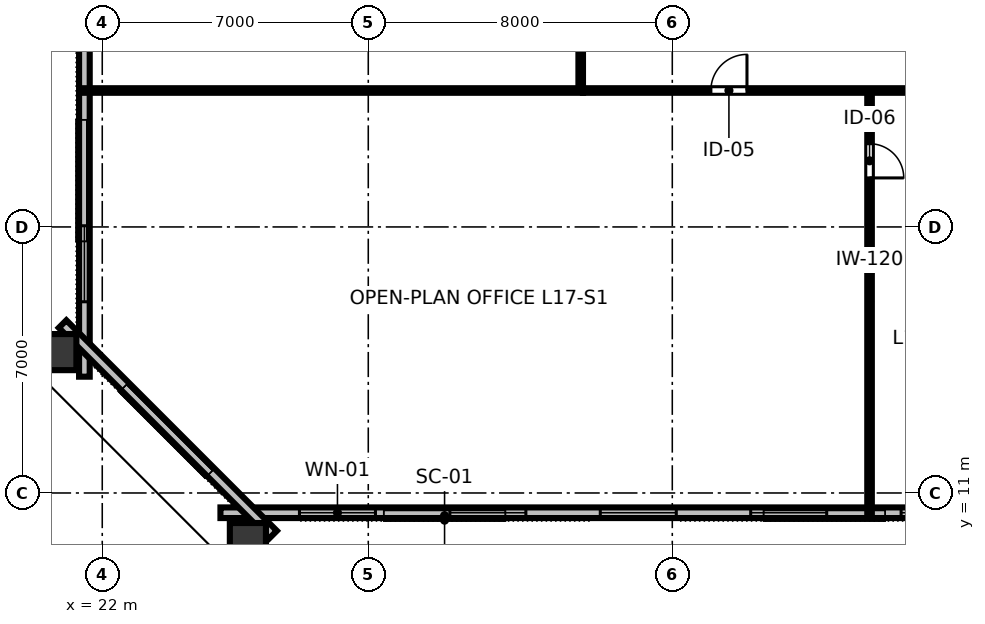
"""IFC4 building model, lengths in metres.
Left out: names, types, materials, properties, quantities, classifications, styles, units other than length and angle.
Written with IfcOpenShell. Run it as: python <this file> out.ifc"""

import sys

from ifc_helpers import new_model, si_unit, direction, frame, frame_2d, origin, origin_2d, place, context, subcontext, project, spatial, rectangle, hollow_rectangle, extrude, element, fill, save


model = new_model("IFC4")
c1 = context("Model", 3, precision=1e-05, world=origin(), true_north=direction((0.0, 1.0)))
c2 = subcontext(c1, "Body", "Model", "MODEL_VIEW")
j1 = project(units=[si_unit("LENGTHUNIT", "METRE"), si_unit("PLANEANGLEUNIT", "RADIAN")], contexts=[c1])
p1 = place(None, origin())
s1 = spatial("IfcSite", under=j1, at=p1, CompositionType="ELEMENT")
p2 = place(p1, origin())
s2 = spatial("IfcBuilding", under=s1, at=p2, CompositionType="ELEMENT")
p3 = place(p2, frame((0.0, 0.0, 67.6)))
s3 = spatial("IfcBuildingStorey", under=s2, at=p3, CompositionType="ELEMENT", Elevation=67.6)
p4 = place(p3, frame((25.832, 9.635, 0.0), z_axis=(-0.044927645815, -0.088480693771, 0.995064155455), x_axis=(0.891639602851, -0.452745865389, 0.0)))
e1 = element("IfcColumn", 1, at=p4, inside=s3, PredefinedType="COLUMN", context=c2, shape_type="SweptSolid", body=[
    extrude(hollow_rectangle(XDim=0.95, YDim=1.15, WallThickness=0.06, at=origin_2d()), origin(), (0.0, 0.0, 1.0), 3.375),
])
p5 = place(p3, frame((20.744, 14.707, 0.0), z_axis=(-0.103221863164, -0.030287087301, 0.994197133021), x_axis=(0.953979075254, 0.279914028383, 0.107573512968)))
e2 = element("IfcColumn", 2, at=p5, inside=s3, PredefinedType="COLUMN", context=c2, shape_type="SweptSolid", body=[
    extrude(hollow_rectangle(XDim=0.95, YDim=1.15, WallThickness=0.06, at=origin_2d()), origin(), (0.0, 0.0, 1.0), 3.377),
])
p6 = place(p3, frame((25.11, 10.48, 0.0), z_axis=(0.0, 0.0, 1.0), x_axis=(1.0, 0.0, 0.0)))
e3 = element("IfcWall", 3, at=p6, inside=s3, PredefinedType="STANDARD", context=c2, shape_type="SweptSolid", body=[
    extrude(rectangle(XDim=41.78, YDim=0.28, at=frame_2d((20.89, 0.0))), origin(), (0.0, 0.0, 1.0), 3.36),
])
p7 = place(p6, frame((2.079, 0.0, 0.8)))
e4 = element("IfcOpeningElement", 4, at=p7, cuts=e3, PredefinedType="OPENING", context=c2, shape_type="SweptSolid", body=[
    extrude(rectangle(XDim=2.0, YDim=1.95, at=frame_2d((1.0, 0.975))), frame((0.0, 0.15, 0.0), z_axis=(0.0, -1.0, 0.0), x_axis=(1.0, 0.0, 0.0)), (0.0, 0.0, 1.0), 0.3),
])
p8 = place(p6, frame((6.037, 0.0, 0.8)))
e5 = element("IfcOpeningElement", 5, at=p8, cuts=e3, PredefinedType="OPENING", context=c2, shape_type="SweptSolid", body=[
    extrude(rectangle(XDim=2.0, YDim=1.95, at=frame_2d((1.0, 0.975))), frame((0.0, 0.15, 0.0), z_axis=(0.0, -1.0, 0.0), x_axis=(1.0, 0.0, 0.0)), (0.0, 0.0, 1.0), 0.3),
])
p9 = place(p6, frame((9.995, 0.0, 0.8)))
e6 = element("IfcOpeningElement", 6, at=p9, cuts=e3, PredefinedType="OPENING", context=c2, shape_type="SweptSolid", body=[
    extrude(rectangle(XDim=2.0, YDim=1.95, at=frame_2d((1.0, 0.975))), frame((0.0, 0.15, 0.0), z_axis=(0.0, -1.0, 0.0), x_axis=(1.0, 0.0, 0.0)), (0.0, 0.0, 1.0), 0.3),
])
p10 = place(p6, frame((13.953, 0.0, 0.8)))
e7 = element("IfcOpeningElement", 7, at=p10, cuts=e3, PredefinedType="OPENING", context=c2, shape_type="SweptSolid", body=[
    extrude(rectangle(XDim=2.0, YDim=1.95, at=frame_2d((1.0, 0.975))), frame((0.0, 0.15, 0.0), z_axis=(0.0, -1.0, 0.0), x_axis=(1.0, 0.0, 0.0)), (0.0, 0.0, 1.0), 0.3),
])
p11 = place(p6, frame((17.911, 0.0, 0.8)))
e8 = element("IfcOpeningElement", 8, at=p11, cuts=e3, PredefinedType="OPENING", context=c2, shape_type="SweptSolid", body=[
    extrude(rectangle(XDim=2.0, YDim=1.95, at=frame_2d((1.0, 0.975))), frame((0.0, 0.15, 0.0), z_axis=(0.0, -1.0, 0.0), x_axis=(1.0, 0.0, 0.0)), (0.0, 0.0, 1.0), 0.3),
])
p12 = place(p6, frame((21.869, 0.0, 0.8)))
e9 = element("IfcOpeningElement", 9, at=p12, cuts=e3, PredefinedType="OPENING", context=c2, shape_type="SweptSolid", body=[
    extrude(rectangle(XDim=2.0, YDim=1.95, at=frame_2d((1.0, 0.975))), frame((0.0, 0.15, 0.0), z_axis=(0.0, -1.0, 0.0), x_axis=(1.0, 0.0, 0.0)), (0.0, 0.0, 1.0), 0.3),
])
p13 = place(p6, frame((29.785, 0.0, 0.8)))
e10 = element("IfcOpeningElement", 10, at=p13, cuts=e3, PredefinedType="OPENING", context=c2, shape_type="SweptSolid", body=[
    extrude(rectangle(XDim=2.0, YDim=1.95, at=frame_2d((1.0, 0.975))), frame((0.0, 0.15, 0.0), z_axis=(0.0, -1.0, 0.0), x_axis=(1.0, 0.0, 0.0)), (0.0, 0.0, 1.0), 0.3),
])
p14 = place(p6, frame((33.743, 0.0, 0.8)))
e11 = element("IfcOpeningElement", 11, at=p14, cuts=e3, PredefinedType="OPENING", context=c2, shape_type="SweptSolid", body=[
    extrude(rectangle(XDim=2.0, YDim=1.95, at=frame_2d((1.0, 0.975))), frame((0.0, 0.15, 0.0), z_axis=(0.0, -1.0, 0.0), x_axis=(1.0, 0.0, 0.0)), (0.0, 0.0, 1.0), 0.3),
])
p15 = place(p6, frame((37.701, 0.0, 0.8)))
e12 = element("IfcOpeningElement", 12, at=p15, cuts=e3, PredefinedType="OPENING", context=c2, shape_type="SweptSolid", body=[
    extrude(rectangle(XDim=2.0, YDim=1.95, at=frame_2d((1.0, 0.975))), frame((0.0, 0.15, 0.0), z_axis=(0.0, -1.0, 0.0), x_axis=(1.0, 0.0, 0.0)), (0.0, 0.0, 1.0), 0.3),
])
p16 = place(p3, frame((21.53, 49.94, 0.0), z_axis=(0.0, 0.0, 1.0), x_axis=(0.0, -1.0, 0.0)))
e13 = element("IfcWall", 13, at=p16, inside=s3, PredefinedType="STANDARD", context=c2, shape_type="SweptSolid", body=[
    extrude(rectangle(XDim=35.88, YDim=0.28, at=frame_2d((17.94, 0.0))), origin(), (0.0, 0.0, 1.0), 3.36),
])
p17 = place(p16, frame((14.57, 0.0, 0.0)))
e14 = element("IfcOpeningElement", 14, at=p17, cuts=e13, PredefinedType="OPENING", context=c2, shape_type="SweptSolid", body=[
    extrude(rectangle(XDim=1.4, YDim=2.15, at=frame_2d((0.7, 1.075))), frame((0.0, 0.15, 0.0), z_axis=(0.0, -1.0, 0.0), x_axis=(1.0, 0.0, 0.0)), (0.0, 0.0, 1.0), 0.3),
])
p18 = place(p16, frame((1.971, 0.0, 0.8)))
e15 = element("IfcOpeningElement", 15, at=p18, cuts=e13, PredefinedType="OPENING", context=c2, shape_type="SweptSolid", body=[
    extrude(rectangle(XDim=2.0, YDim=1.95, at=frame_2d((1.0, 0.975))), frame((0.0, 0.15, 0.0), z_axis=(0.0, -1.0, 0.0), x_axis=(1.0, 0.0, 0.0)), (0.0, 0.0, 1.0), 0.3),
])
p19 = place(p16, frame((9.456, 0.0, 0.8)))
e16 = element("IfcOpeningElement", 16, at=p19, cuts=e13, PredefinedType="OPENING", context=c2, shape_type="SweptSolid", body=[
    extrude(rectangle(XDim=2.0, YDim=1.95, at=frame_2d((1.0, 0.975))), frame((0.0, 0.15, 0.0), z_axis=(0.0, -1.0, 0.0), x_axis=(1.0, 0.0, 0.0)), (0.0, 0.0, 1.0), 0.3),
])
p20 = place(p16, frame((20.682, 0.0, 0.8)))
e17 = element("IfcOpeningElement", 17, at=p20, cuts=e13, PredefinedType="OPENING", context=c2, shape_type="SweptSolid", body=[
    extrude(rectangle(XDim=2.0, YDim=1.95, at=frame_2d((1.0, 0.975))), frame((0.0, 0.15, 0.0), z_axis=(0.0, -1.0, 0.0), x_axis=(1.0, 0.0, 0.0)), (0.0, 0.0, 1.0), 0.3),
])
p21 = place(p16, frame((24.424, 0.0, 0.8)))
e18 = element("IfcOpeningElement", 18, at=p21, cuts=e13, PredefinedType="OPENING", context=c2, shape_type="SweptSolid", body=[
    extrude(rectangle(XDim=2.0, YDim=1.95, at=frame_2d((1.0, 0.975))), frame((0.0, 0.15, 0.0), z_axis=(0.0, -1.0, 0.0), x_axis=(1.0, 0.0, 0.0)), (0.0, 0.0, 1.0), 0.3),
])
p22 = place(p16, frame((31.909, 0.0, 0.8)))
e19 = element("IfcOpeningElement", 19, at=p22, cuts=e13, PredefinedType="OPENING", context=c2, shape_type="SweptSolid", body=[
    extrude(rectangle(XDim=2.0, YDim=1.95, at=frame_2d((1.0, 0.975))), frame((0.0, 0.15, 0.0), z_axis=(0.0, -1.0, 0.0), x_axis=(1.0, 0.0, 0.0)), (0.0, 0.0, 1.0), 0.3),
])
p23 = place(p3, frame((20.956, 15.446, 0.0), z_axis=(0.0, 0.0, 1.0), x_axis=(0.707106781187, -0.707106781187, 0.0)))
e20 = element("IfcWall", 20, at=p23, inside=s3, PredefinedType="STANDARD", context=c2, shape_type="SweptSolid", body=[
    extrude(rectangle(XDim=7.834, YDim=0.28, at=frame_2d((3.917, 0.0))), origin(), (0.0, 0.0, 1.0), 3.36),
])
p24 = place(p3, frame((42.191, 21.59, 0.0), z_axis=(0.0, 0.0, 1.0), x_axis=(0.0, -1.0, 0.0)))
e21 = element("IfcWall", 21, at=p24, inside=s3, PredefinedType="PARTITIONING", context=c2, shape_type="SweptSolid", body=[
    extrude(rectangle(XDim=11.11, YDim=0.12, at=frame_2d((5.555, 0.0))), origin(), (0.0, 0.0, 1.0), 2.64),
])
p25 = place(p24, frame((1.4, 0.0, 0.0)))
e22 = element("IfcOpeningElement", 22, at=p25, cuts=e21, PredefinedType="OPENING", context=c2, shape_type="SweptSolid", body=[
    extrude(rectangle(XDim=0.9, YDim=2.15, at=frame_2d((0.45, 1.075))), frame((0.0, 0.07, 0.0), z_axis=(0.0, -1.0, 0.0), x_axis=(1.0, 0.0, 0.0)), (0.0, 0.0, 1.0), 0.14),
])
p26 = place(p3, frame((34.65, 21.59, 0.0), z_axis=(0.0, 0.0, 1.0), x_axis=(1.0, 0.0, 0.0)))
e23 = element("IfcWall", 23, at=p26, inside=s3, PredefinedType="PARTITIONING", context=c2, shape_type="SweptSolid", body=[
    extrude(rectangle(XDim=22.7, YDim=0.12, at=frame_2d((11.35, 0.0))), origin(), (0.0, 0.0, 1.0), 2.64),
])
p27 = place(p26, frame((3.365, 0.0, 0.0)))
e24 = element("IfcOpeningElement", 24, at=p27, cuts=e23, PredefinedType="OPENING", context=c2, shape_type="SweptSolid", body=[
    extrude(rectangle(XDim=0.95, YDim=2.15, at=frame_2d((0.475, 1.075))), frame((0.0, 0.07, 0.0), z_axis=(0.0, -1.0, 0.0), x_axis=(1.0, 0.0, 0.0)), (0.0, 0.0, 1.0), 0.14),
])
p28 = place(p26, frame((8.718, 0.0, 0.0)))
e25 = element("IfcOpeningElement", 25, at=p28, cuts=e23, PredefinedType="OPENING", context=c2, shape_type="SweptSolid", body=[
    extrude(rectangle(XDim=0.95, YDim=2.15, at=frame_2d((0.475, 1.075))), frame((0.0, 0.07, 0.0), z_axis=(0.0, -1.0, 0.0), x_axis=(1.0, 0.0, 0.0)), (0.0, 0.0, 1.0), 0.14),
])
p29 = place(p26, frame((13.651, 0.0, 0.0)))
e26 = element("IfcOpeningElement", 26, at=p29, cuts=e23, PredefinedType="OPENING", context=c2, shape_type="SweptSolid", body=[
    extrude(rectangle(XDim=0.95, YDim=2.15, at=frame_2d((0.475, 1.075))), frame((0.0, 0.07, 0.0), z_axis=(0.0, -1.0, 0.0), x_axis=(1.0, 0.0, 0.0)), (0.0, 0.0, 1.0), 0.14),
])
p30 = place(p26, frame((19.509, 0.0, 0.0)))
e27 = element("IfcOpeningElement", 27, at=p30, cuts=e23, PredefinedType="OPENING", context=c2, shape_type="SweptSolid", body=[
    extrude(rectangle(XDim=0.95, YDim=2.15, at=frame_2d((0.475, 1.075))), frame((0.0, 0.07, 0.0), z_axis=(0.0, -1.0, 0.0), x_axis=(1.0, 0.0, 0.0)), (0.0, 0.0, 1.0), 0.14),
])
p31 = place(p3, frame((34.59, 21.65, 0.0), z_axis=(0.0, 0.0, 1.0), x_axis=(0.0, 1.0, 0.0)))
e28 = element("IfcWall", 28, at=p31, inside=s3, PredefinedType="PARTITIONING", context=c2, shape_type="SweptSolid", body=[
    extrude(rectangle(XDim=20.7, YDim=0.12, at=frame_2d((10.35, 0.0))), origin(), (0.0, 0.0, 1.0), 2.64),
])
p32 = place(p31, frame((6.696, 0.0, 0.0)))
e29 = element("IfcOpeningElement", 29, at=p32, cuts=e28, PredefinedType="OPENING", context=c2, shape_type="SweptSolid", body=[
    extrude(rectangle(XDim=0.95, YDim=2.15, at=frame_2d((0.475, 1.075))), frame((0.0, 0.07, 0.0), z_axis=(0.0, -1.0, 0.0), x_axis=(1.0, 0.0, 0.0)), (0.0, 0.0, 1.0), 0.14),
])
p33 = place(p31, frame((16.846, 0.0, 0.0)))
e30 = element("IfcOpeningElement", 30, at=p33, cuts=e28, PredefinedType="OPENING", context=c2, shape_type="SweptSolid", body=[
    extrude(rectangle(XDim=0.95, YDim=2.15, at=frame_2d((0.475, 1.075))), frame((0.0, 0.07, 0.0), z_axis=(0.0, -1.0, 0.0), x_axis=(1.0, 0.0, 0.0)), (0.0, 0.0, 1.0), 0.14),
])
p34 = place(p3, frame((34.65, 21.59, 0.0), z_axis=(0.0, 0.0, 1.0), x_axis=(-1.0, 0.0, 0.0)))
e31 = element("IfcWall", 31, at=p34, inside=s3, PredefinedType="PARTITIONING", context=c2, shape_type="SweptSolid", body=[
    extrude(rectangle(XDim=13.12, YDim=0.12, at=frame_2d((6.56, 0.0))), origin(), (0.0, 0.0, 1.0), 2.64),
])
p35 = place(p7, origin())
e32 = element("IfcWindow", 32, at=p35, inside=s3, PartitioningType="SINGLE_PANEL", PredefinedType="WINDOW", context=c2, shape_type="SweptSolid", body=[
    extrude(rectangle(XDim=2.0, YDim=1.95, at=frame_2d((1.0, 0.975))), frame((0.0, 0.03, 0.0), z_axis=(0.0, -1.0, 0.0), x_axis=(1.0, 0.0, 0.0)), (0.0, 0.0, 1.0), 0.06),
])
fill(e4, e32)
p36 = place(p8, origin())
e33 = element("IfcWindow", 33, at=p36, inside=s3, PartitioningType="SINGLE_PANEL", PredefinedType="WINDOW", context=c2, shape_type="SweptSolid", body=[
    extrude(rectangle(XDim=2.0, YDim=1.95, at=frame_2d((1.0, 0.975))), frame((0.0, 0.03, 0.0), z_axis=(0.0, -1.0, 0.0), x_axis=(1.0, 0.0, 0.0)), (0.0, 0.0, 1.0), 0.06),
])
fill(e5, e33)
p37 = place(p9, origin())
e34 = element("IfcWindow", 34, at=p37, inside=s3, PartitioningType="SINGLE_PANEL", PredefinedType="WINDOW", context=c2, shape_type="SweptSolid", body=[
    extrude(rectangle(XDim=2.0, YDim=1.95, at=frame_2d((1.0, 0.975))), frame((0.0, 0.03, 0.0), z_axis=(0.0, -1.0, 0.0), x_axis=(1.0, 0.0, 0.0)), (0.0, 0.0, 1.0), 0.06),
])
fill(e6, e34)
p38 = place(p10, origin())
e35 = element("IfcWindow", 35, at=p38, inside=s3, PartitioningType="SINGLE_PANEL", PredefinedType="WINDOW", context=c2, shape_type="SweptSolid", body=[
    extrude(rectangle(XDim=2.0, YDim=1.95, at=frame_2d((1.0, 0.975))), frame((0.0, 0.03, 0.0), z_axis=(0.0, -1.0, 0.0), x_axis=(1.0, 0.0, 0.0)), (0.0, 0.0, 1.0), 0.06),
])
fill(e7, e35)
p39 = place(p11, origin())
e36 = element("IfcWindow", 36, at=p39, inside=s3, PartitioningType="SINGLE_PANEL", PredefinedType="WINDOW", context=c2, shape_type="SweptSolid", body=[
    extrude(rectangle(XDim=2.0, YDim=1.95, at=frame_2d((1.0, 0.975))), frame((0.0, 0.03, 0.0), z_axis=(0.0, -1.0, 0.0), x_axis=(1.0, 0.0, 0.0)), (0.0, 0.0, 1.0), 0.06),
])
fill(e8, e36)
p40 = place(p22, origin())
e37 = element("IfcWindow", 37, at=p40, inside=s3, PartitioningType="SINGLE_PANEL", PredefinedType="WINDOW", context=c2, shape_type="SweptSolid", body=[
    extrude(rectangle(XDim=2.0, YDim=1.95, at=frame_2d((1.0, 0.975))), frame((0.0, 0.03, 0.0), z_axis=(0.0, -1.0, 0.0), x_axis=(1.0, 0.0, 0.0)), (0.0, 0.0, 1.0), 0.06),
])
fill(e19, e37)
p41 = place(p25, origin())
e38 = element("IfcDoor", 38, at=p41, inside=s3, OperationType="SINGLE_SWING_RIGHT", PredefinedType="DOOR", context=c2, shape_type="SweptSolid", body=[
    extrude(rectangle(XDim=0.9, YDim=2.15, at=frame_2d((0.45, 1.075))), frame((0.0, 0.025, 0.0), z_axis=(0.0, -1.0, 0.0), x_axis=(1.0, 0.0, 0.0)), (0.0, 0.0, 1.0), 0.05),
])
fill(e22, e38)
p42 = place(p27, origin())
e39 = element("IfcDoor", 39, at=p42, inside=s3, OperationType="SINGLE_SWING_RIGHT", PredefinedType="DOOR", context=c2, shape_type="SweptSolid", body=[
    extrude(rectangle(XDim=0.95, YDim=2.15, at=frame_2d((0.475, 1.075))), frame((0.0, 0.025, 0.0), z_axis=(0.0, -1.0, 0.0), x_axis=(1.0, 0.0, 0.0)), (0.0, 0.0, 1.0), 0.05),
])
fill(e24, e39)
save(model, sys.argv[1])
